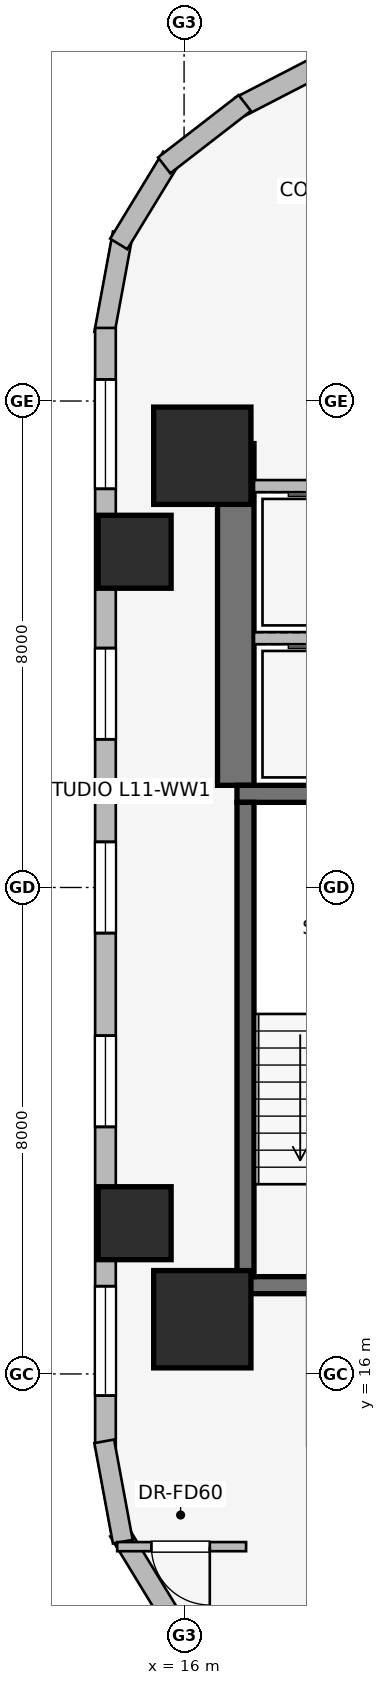
"""IFC4 building model, lengths in metres.
Left out: names, types, materials, properties, quantities, classifications, styles, units other than length and angle.
Written with IfcOpenShell. Run it as: python <this file> out.ifc"""

import sys

from ifc_helpers import new_model, si_unit, direction, frame, frame_2d, origin, origin_2d, place, context, subcontext, project, spatial, rectangle, extrude, element, fill, save


model = new_model("IFC4")
c1 = context("Model", 3, precision=1e-05, world=origin(), true_north=direction((0.0, 1.0)))
c2 = subcontext(c1, "Body", "Model", "MODEL_VIEW")
j1 = project(units=[si_unit("LENGTHUNIT", "METRE"), si_unit("PLANEANGLEUNIT", "RADIAN")], contexts=[c1])
p1 = place(None, origin())
s1 = spatial("IfcSite", under=j1, at=p1, CompositionType="ELEMENT")
p2 = place(p1, origin())
s2 = spatial("IfcBuilding", under=s1, at=p2, CompositionType="ELEMENT")
p3 = place(p2, frame((0.0, 0.0, 45.25)))
s3 = spatial("IfcBuildingStorey", under=s2, at=p3, CompositionType="ELEMENT", Elevation=45.25)
p4 = place(p3, frame((16.85, 25.68, 0.0), z_axis=(0.0, 0.0, 1.0), x_axis=(0.0, 1.0, 0.0)))
e1 = element("IfcWall", 1, at=p4, inside=s3, PredefinedType="SHEAR", context=c2, shape_type="SweptSolid", body=[
    extrude(rectangle(XDim=5.62, YDim=0.6, at=frame_2d((2.81, 0.0))), origin(), (0.0, 0.0, 1.0), 3.65),
])
for number, where, z_axis, x_axis in (
    (2, (16.87, 17.46, 0.0), (0.0, 0.0, 1.0), (1.0, 0.0, 0.0)),
    (3, (20.63, 25.54, 0.0), (0.0, 0.0, 1.0), (-1.0, 0.0, 0.0)),
):
    element("IfcWall", number, at=place(p3, frame(where, z_axis=z_axis, x_axis=x_axis)), inside=s3, PredefinedType="SHEAR", context=c2, shape_type="SweptSolid", body=[
        extrude(rectangle(XDim=3.76, YDim=0.28, at=frame_2d((1.88, 0.0))), origin(), (0.0, 0.0, 1.0), 3.65),
    ])
p5 = place(p3, frame((17.01, 25.4, 0.0), z_axis=(0.0, 0.0, 1.0), x_axis=(0.0, -1.0, 0.0)))
e4 = element("IfcWall", 4, at=p5, inside=s3, PredefinedType="SHEAR", context=c2, shape_type="SweptSolid", body=[
    extrude(rectangle(XDim=7.8, YDim=0.28, at=frame_2d((3.9, 0.0))), origin(), (0.0, 0.0, 1.0), 3.65),
])
for number, where, z_axis, x_axis in (
    (5, (16.3, 16.9, 0.0), (0.0, 0.0, 1.0), (1.0, 0.0, 0.0)),
    (6, (16.3, 31.1, 0.0), (0.0, 0.0, 1.0), (1.0, 0.0, 0.0)),
):
    element("IfcColumn", number, at=place(p3, frame(where, z_axis=z_axis, x_axis=x_axis)), inside=s3, PredefinedType="COLUMN", context=c2, shape_type="SweptSolid", body=[
        extrude(rectangle(XDim=1.6, YDim=1.6, at=origin_2d()), origin(), (0.0, 0.0, 1.0), 3.65),
    ])
for number, where, z_axis, x_axis in (
    (7, (15.187, 29.521, 0.0), (0.0, 0.0, 1.0), (1.0, 0.0, 0.0)),
    (8, (15.187, 18.479, 0.0), (0.0, 0.0, 1.0), (1.0, 0.0, 0.0)),
):
    element("IfcColumn", number, at=place(p3, frame(where, z_axis=z_axis, x_axis=x_axis)), inside=s3, PredefinedType="COLUMN", context=c2, shape_type="SweptSolid", body=[
        extrude(rectangle(XDim=1.2, YDim=1.2, at=origin_2d()), origin(), (0.0, 0.0, 1.0), 3.65),
    ])
p6 = place(p3, frame((16.924, 36.841, 0.0), z_axis=(0.0, 0.0, 1.0), x_axis=(0.888634413993, 0.458616264721, 0.0)))
e9 = element("IfcWall", 9, at=p6, inside=s3, PredefinedType="STANDARD", context=c2, shape_type="SweptSolid", body=[
    extrude(rectangle(XDim=20.531, YDim=0.34, at=frame_2d((10.266, 0.0))), origin(), (0.0, 0.0, 1.0), 2.684),
])
p7 = place(p6, frame((9.716, 0.0, 0.0)))
e10 = element("IfcOpeningElement", 10, at=p7, cuts=e9, PredefinedType="OPENING", context=c2, shape_type="SweptSolid", body=[
    extrude(rectangle(XDim=1.1, YDim=2.04, at=frame_2d((0.55, 1.02))), frame((0.0, 0.18, 0.0), z_axis=(0.0, -1.0, 0.0), x_axis=(1.0, 0.0, 0.0)), (0.0, 0.0, 1.0), 0.36),
])
p8 = place(p6, frame((2.161, 0.0, 0.75)))
e11 = element("IfcOpeningElement", 11, at=p8, cuts=e9, PredefinedType="OPENING", context=c2, shape_type="SweptSolid", body=[
    extrude(rectangle(XDim=1.05, YDim=1.4, at=frame_2d((0.525, 0.7))), frame((0.0, 0.18, 0.0), z_axis=(0.0, -1.0, 0.0), x_axis=(1.0, 0.0, 0.0)), (0.0, 0.0, 1.0), 0.36),
])
p9 = place(p6, frame((5.234, 0.0, 0.75)))
e12 = element("IfcOpeningElement", 12, at=p9, cuts=e9, PredefinedType="OPENING", context=c2, shape_type="SweptSolid", body=[
    extrude(rectangle(XDim=1.5, YDim=1.5, at=frame_2d((0.75, 0.75))), frame((0.0, 0.18, 0.0), z_axis=(0.0, -1.0, 0.0), x_axis=(1.0, 0.0, 0.0)), (0.0, 0.0, 1.0), 0.36),
])
p10 = place(p6, frame((7.509, 0.0, 0.75)))
e13 = element("IfcOpeningElement", 13, at=p10, cuts=e9, PredefinedType="OPENING", context=c2, shape_type="SweptSolid", body=[
    extrude(rectangle(XDim=1.5, YDim=1.5, at=frame_2d((0.75, 0.75))), frame((0.0, 0.18, 0.0), z_axis=(0.0, -1.0, 0.0), x_axis=(1.0, 0.0, 0.0)), (0.0, 0.0, 1.0), 0.36),
])
p11 = place(p6, frame((11.373, 0.0, 0.75)))
e14 = element("IfcOpeningElement", 14, at=p11, cuts=e9, PredefinedType="OPENING", context=c2, shape_type="SweptSolid", body=[
    extrude(rectangle(XDim=1.8, YDim=1.5, at=frame_2d((0.9, 0.75))), frame((0.0, 0.18, 0.0), z_axis=(0.0, -1.0, 0.0), x_axis=(1.0, 0.0, 0.0)), (0.0, 0.0, 1.0), 0.36),
])
p12 = place(p6, frame((13.648, 0.0, 0.75)))
e15 = element("IfcOpeningElement", 15, at=p12, cuts=e9, PredefinedType="OPENING", context=c2, shape_type="SweptSolid", body=[
    extrude(rectangle(XDim=1.8, YDim=1.5, at=frame_2d((0.9, 0.75))), frame((0.0, 0.18, 0.0), z_axis=(0.0, -1.0, 0.0), x_axis=(1.0, 0.0, 0.0)), (0.0, 0.0, 1.0), 0.36),
])
p13 = place(p6, frame((17.476, 0.0, 0.75)))
e16 = element("IfcOpeningElement", 16, at=p13, cuts=e9, PredefinedType="OPENING", context=c2, shape_type="SweptSolid", body=[
    extrude(rectangle(XDim=1.05, YDim=1.4, at=frame_2d((0.525, 0.7))), frame((0.0, 0.18, 0.0), z_axis=(0.0, -1.0, 0.0), x_axis=(1.0, 0.0, 0.0)), (0.0, 0.0, 1.0), 0.36),
])
p14 = place(p3, frame((14.687, 33.108, 0.0), z_axis=(0.0, 0.0, 1.0), x_axis=(0.181714143354, 0.983351397063, 0.0)))
e17 = element("IfcWall", 17, at=p14, inside=s3, PredefinedType="STANDARD", context=c2, shape_type="SweptSolid", body=[
    extrude(rectangle(XDim=1.678, YDim=0.33, at=frame_2d((0.839, 0.0))), origin(), (0.0, 0.0, 1.0), 3.39),
])
p15 = place(p3, frame((14.925, 34.583, 0.0), z_axis=(0.0, 0.0, 1.0), x_axis=(0.520584129191, 0.853810379671, 0.0)))
e18 = element("IfcWall", 18, at=p15, inside=s3, PredefinedType="STANDARD", context=c2, shape_type="SweptSolid", body=[
    extrude(rectangle(XDim=1.677, YDim=0.33, at=frame_2d((0.838, 0.0))), origin(), (0.0, 0.0, 1.0), 3.39),
])
p16 = place(p3, frame((15.673, 35.875, 0.0), z_axis=(0.0, 0.0, 1.0), x_axis=(0.790691856293, 0.61221433207, 0.0)))
e19 = element("IfcWall", 19, at=p16, inside=s3, PredefinedType="STANDARD", context=c2, shape_type="SweptSolid", body=[
    extrude(rectangle(XDim=1.676, YDim=0.33, at=frame_2d((0.838, 0.0))), origin(), (0.0, 0.0, 1.0), 3.39),
])
p17 = place(p3, frame((14.707, 14.798, 0.0), z_axis=(0.0, 0.0, 1.0), x_axis=(0.0, 1.0, 0.0)))
e20 = element("IfcWall", 20, at=p17, inside=s3, PredefinedType="STANDARD", context=c2, shape_type="SweptSolid", body=[
    extrude(rectangle(XDim=18.404, YDim=0.34, at=frame_2d((9.202, 0.0))), origin(), (0.0, 0.0, 1.0), 2.684),
])
p18 = place(p17, frame((0.845, 0.0, 0.75)))
e21 = element("IfcOpeningElement", 21, at=p18, cuts=e20, PredefinedType="OPENING", context=c2, shape_type="SweptSolid", body=[
    extrude(rectangle(XDim=1.8, YDim=1.5, at=frame_2d((0.9, 0.75))), frame((0.0, 0.18, 0.0), z_axis=(0.0, -1.0, 0.0), x_axis=(1.0, 0.0, 0.0)), (0.0, 0.0, 1.0), 0.36),
])
p19 = place(p17, frame((5.265, 0.0, 0.75)))
e22 = element("IfcOpeningElement", 22, at=p19, cuts=e20, PredefinedType="OPENING", context=c2, shape_type="SweptSolid", body=[
    extrude(rectangle(XDim=1.5, YDim=1.5, at=frame_2d((0.75, 0.75))), frame((0.0, 0.18, 0.0), z_axis=(0.0, -1.0, 0.0), x_axis=(1.0, 0.0, 0.0)), (0.0, 0.0, 1.0), 0.36),
])
p20 = place(p17, frame((8.452, 0.0, 0.75)))
e23 = element("IfcOpeningElement", 23, at=p20, cuts=e20, PredefinedType="OPENING", context=c2, shape_type="SweptSolid", body=[
    extrude(rectangle(XDim=1.5, YDim=1.5, at=frame_2d((0.75, 0.75))), frame((0.0, 0.18, 0.0), z_axis=(0.0, -1.0, 0.0), x_axis=(1.0, 0.0, 0.0)), (0.0, 0.0, 1.0), 0.36),
])
p21 = place(p17, frame((11.639, 0.0, 0.75)))
e24 = element("IfcOpeningElement", 24, at=p21, cuts=e20, PredefinedType="OPENING", context=c2, shape_type="SweptSolid", body=[
    extrude(rectangle(XDim=1.5, YDim=1.5, at=frame_2d((0.75, 0.75))), frame((0.0, 0.18, 0.0), z_axis=(0.0, -1.0, 0.0), x_axis=(1.0, 0.0, 0.0)), (0.0, 0.0, 1.0), 0.36),
])
p22 = place(p17, frame((15.758, 0.0, 0.75)))
e25 = element("IfcOpeningElement", 25, at=p22, cuts=e20, PredefinedType="OPENING", context=c2, shape_type="SweptSolid", body=[
    extrude(rectangle(XDim=1.8, YDim=1.5, at=frame_2d((0.9, 0.75))), frame((0.0, 0.18, 0.0), z_axis=(0.0, -1.0, 0.0), x_axis=(1.0, 0.0, 0.0)), (0.0, 0.0, 1.0), 0.36),
])
p23 = place(p3, frame((16.998, 11.099, 0.0), z_axis=(0.0, 0.0, 1.0), x_axis=(-0.790691856293, 0.61221433207, 0.0)))
e26 = element("IfcWall", 26, at=p23, inside=s3, PredefinedType="STANDARD", context=c2, shape_type="SweptSolid", body=[
    extrude(rectangle(XDim=1.676, YDim=0.33, at=frame_2d((0.838, 0.0))), origin(), (0.0, 0.0, 1.0), 3.39),
])
p24 = place(p3, frame((15.798, 11.985, 0.0), z_axis=(0.0, 0.0, 1.0), x_axis=(-0.520584129191, 0.853810379671, 0.0)))
e27 = element("IfcWall", 27, at=p24, inside=s3, PredefinedType="STANDARD", context=c2, shape_type="SweptSolid", body=[
    extrude(rectangle(XDim=1.677, YDim=0.33, at=frame_2d((0.838, 0.0))), origin(), (0.0, 0.0, 1.0), 3.39),
])
p25 = place(p3, frame((14.992, 13.242, 0.0), z_axis=(0.0, 0.0, 1.0), x_axis=(-0.181714143354, 0.983351397063, 0.0)))
e28 = element("IfcWall", 28, at=p25, inside=s3, PredefinedType="STANDARD", context=c2, shape_type="SweptSolid", body=[
    extrude(rectangle(XDim=1.678, YDim=0.33, at=frame_2d((0.839, 0.0))), origin(), (0.0, 0.0, 1.0), 3.39),
])
p26 = place(p3, frame((17.15, 28.1, 0.0), z_axis=(0.0, 0.0, 1.0), x_axis=(1.0, 0.0, 0.0)))
e29 = element("IfcWall", 29, at=p26, inside=s3, PredefinedType="PARTITIONING", context=c2, shape_type="SweptSolid", body=[
    extrude(rectangle(XDim=2.5, YDim=0.2, at=frame_2d((1.25, 0.0))), origin(), (0.0, 0.0, 1.0), 3.39),
])
p27 = place(p3, frame((19.65, 30.6, 0.0), z_axis=(0.0, 0.0, 1.0), x_axis=(-1.0, 0.0, 0.0)))
e30 = element("IfcWall", 30, at=p27, inside=s3, PredefinedType="PARTITIONING", context=c2, shape_type="SweptSolid", body=[
    extrude(rectangle(XDim=2.5, YDim=0.2, at=frame_2d((1.25, 0.0))), origin(), (0.0, 0.0, 1.0), 2.29),
])
p28 = place(p3, frame((17.02, 13.16, 0.0), z_axis=(0.0, 0.0, 1.0), x_axis=(-1.0, 0.0, 0.0)))
e31 = element("IfcWall", 31, at=p28, inside=s3, PredefinedType="PARTITIONING", context=c2, shape_type="SweptSolid", body=[
    extrude(rectangle(XDim=2.12, YDim=0.15, at=frame_2d((1.06, 0.0))), origin(), (0.0, 0.0, 1.0), 3.39),
])
p29 = place(p28, frame((0.597, 0.0, 0.0)))
e32 = element("IfcOpeningElement", 32, at=p29, cuts=e31, PredefinedType="OPENING", context=c2, shape_type="SweptSolid", body=[
    extrude(rectangle(XDim=0.96, YDim=2.0, at=frame_2d((0.48, 1.0))), frame((0.0, 0.085, 0.0), z_axis=(0.0, -1.0, 0.0), x_axis=(1.0, 0.0, 0.0)), (0.0, 0.0, 1.0), 0.17),
])
p30 = place(p18, origin())
e33 = element("IfcWindow", 33, at=p30, inside=s3, PartitioningType="SINGLE_PANEL", PredefinedType="WINDOW", context=c2, shape_type="SweptSolid", body=[
    extrude(rectangle(XDim=1.8, YDim=1.5, at=frame_2d((0.9, 0.75))), frame((0.0, 0.03, 0.0), z_axis=(0.0, -1.0, 0.0), x_axis=(1.0, 0.0, 0.0)), (0.0, 0.0, 1.0), 0.06),
])
fill(e21, e33)
p31 = place(p19, origin())
e34 = element("IfcWindow", 34, at=p31, inside=s3, PartitioningType="SINGLE_PANEL", PredefinedType="WINDOW", context=c2, shape_type="SweptSolid", body=[
    extrude(rectangle(XDim=1.5, YDim=1.5, at=frame_2d((0.75, 0.75))), frame((0.0, 0.03, 0.0), z_axis=(0.0, -1.0, 0.0), x_axis=(1.0, 0.0, 0.0)), (0.0, 0.0, 1.0), 0.06),
])
fill(e22, e34)
p32 = place(p20, origin())
e35 = element("IfcWindow", 35, at=p32, inside=s3, PartitioningType="SINGLE_PANEL", PredefinedType="WINDOW", context=c2, shape_type="SweptSolid", body=[
    extrude(rectangle(XDim=1.5, YDim=1.5, at=frame_2d((0.75, 0.75))), frame((0.0, 0.03, 0.0), z_axis=(0.0, -1.0, 0.0), x_axis=(1.0, 0.0, 0.0)), (0.0, 0.0, 1.0), 0.06),
])
fill(e23, e35)
p33 = place(p21, origin())
e36 = element("IfcWindow", 36, at=p33, inside=s3, PartitioningType="SINGLE_PANEL", PredefinedType="WINDOW", context=c2, shape_type="SweptSolid", body=[
    extrude(rectangle(XDim=1.5, YDim=1.5, at=frame_2d((0.75, 0.75))), frame((0.0, 0.03, 0.0), z_axis=(0.0, -1.0, 0.0), x_axis=(1.0, 0.0, 0.0)), (0.0, 0.0, 1.0), 0.06),
])
fill(e24, e36)
p34 = place(p22, origin())
e37 = element("IfcWindow", 37, at=p34, inside=s3, PartitioningType="SINGLE_PANEL", PredefinedType="WINDOW", context=c2, shape_type="SweptSolid", body=[
    extrude(rectangle(XDim=1.8, YDim=1.5, at=frame_2d((0.9, 0.75))), frame((0.0, 0.03, 0.0), z_axis=(0.0, -1.0, 0.0), x_axis=(1.0, 0.0, 0.0)), (0.0, 0.0, 1.0), 0.06),
])
fill(e25, e37)
p35 = place(p29, origin())
e38 = element("IfcDoor", 38, at=p35, inside=s3, OperationType="SINGLE_SWING_LEFT", PredefinedType="DOOR", context=c2, shape_type="SweptSolid", body=[
    extrude(rectangle(XDim=0.96, YDim=2.0, at=frame_2d((0.48, 1.0))), frame((0.0, 0.025, 0.0), z_axis=(0.0, -1.0, 0.0), x_axis=(1.0, 0.0, 0.0)), (0.0, 0.0, 1.0), 0.05),
])
fill(e32, e38)
save(model, sys.argv[1])
